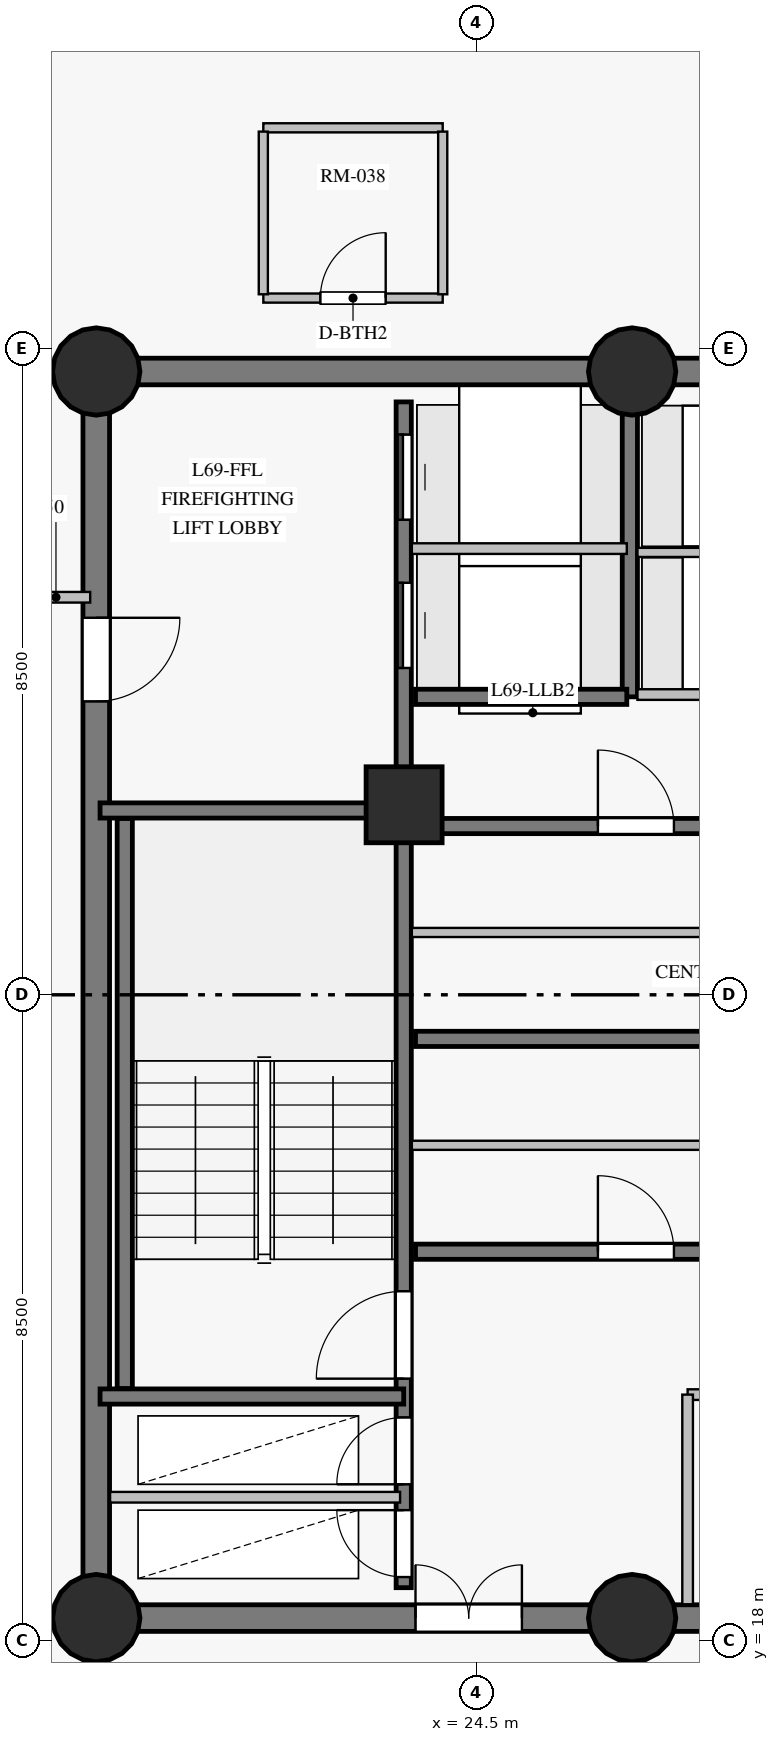
"""IFC4 building model, lengths in metres.
Left out: names, types, materials, properties, quantities, classifications, styles, units other than length and angle.
Written with IfcOpenShell. Run it as: python <this file> out.ifc"""

import sys

from ifc_helpers import new_model, si_unit, direction, frame, frame_2d, origin, origin_with_axes, origin_2d, place, context, subcontext, project, spatial, rectangle, circle, extrude, source, transform, mapped, element, fill, save


model = new_model("IFC4")
c1 = context("Model", 3, precision=1e-05, world=origin(), true_north=direction((0.0, 1.0)))
c2 = subcontext(c1, "Body", "Model", "MODEL_VIEW")
j1 = project(units=[si_unit("LENGTHUNIT", "METRE"), si_unit("PLANEANGLEUNIT", "RADIAN")], contexts=[c1])
p1 = place(None, origin())
s1 = spatial("IfcSite", under=j1, at=p1, CompositionType="ELEMENT")
p2 = place(p1, origin())
s2 = spatial("IfcBuilding", under=s1, at=p2, CompositionType="ELEMENT")
p3 = place(p2, frame((0.0, 0.0, 235.2)))
s3 = spatial("IfcBuildingStorey", under=s2, at=p3, CompositionType="ELEMENT", Elevation=235.2)
p4 = place(p3, frame((19.5, 18.3, 0.0), z_axis=(0.0, 0.0, 1.0), x_axis=(1.0, 0.0, 0.0)))
e1 = element("IfcWall", 1, at=p4, inside=s3, PredefinedType="SHEAR", context=c2, shape_type="SweptSolid", body=[
    extrude(rectangle(XDim=7.05, YDim=0.35, at=frame_2d((3.525, 0.0))), origin(), (0.0, 0.0, 1.0), 2.85),
])
p5 = place(p4, frame((4.2, 0.0, 0.0)))
e2 = element("IfcOpeningElement", 2, at=p5, cuts=e1, PredefinedType="OPENING", context=c2, shape_type="SweptSolid", body=[
    extrude(rectangle(XDim=1.4, YDim=2.2, at=frame_2d((0.7, 1.1))), frame((0.0, 0.185, 0.0), z_axis=(0.0, -1.0, 0.0), x_axis=(1.0, 0.0, 0.0)), (0.0, 0.0, 1.0), 0.37),
])
p6 = place(p3, frame((26.55, 18.3, 0.0), z_axis=(0.0, 0.0, 1.0), x_axis=(1.0, 0.0, 0.0)))
e3 = element("IfcWall", 3, at=p6, inside=s3, PredefinedType="SHEAR", context=c2, shape_type="SweptSolid", body=[
    extrude(rectangle(XDim=10.95, YDim=0.35, at=frame_2d((5.475, 0.0))), origin(), (0.0, 0.0, 1.0), 2.85),
])
p7 = place(p6, frame((4.55, 0.0, 0.0)))
e4 = element("IfcOpeningElement", 4, at=p7, cuts=e3, PredefinedType="OPENING", context=c2, shape_type="SweptSolid", body=[
    extrude(rectangle(XDim=1.4, YDim=2.2, at=frame_2d((0.7, 1.1))), frame((0.0, 0.185, 0.0), z_axis=(0.0, -1.0, 0.0), x_axis=(1.0, 0.0, 0.0)), (0.0, 0.0, 1.0), 0.37),
])
p8 = place(p3, frame((37.5, 34.7, 0.0), z_axis=(0.0, 0.0, 1.0), x_axis=(-1.0, 0.0, 0.0)))
e5 = element("IfcWall", 5, at=p8, inside=s3, PredefinedType="SHEAR", context=c2, shape_type="SweptSolid", body=[
    extrude(rectangle(XDim=10.95, YDim=0.35, at=frame_2d((5.475, 0.0))), origin(), (0.0, 0.0, 1.0), 2.85),
])
p9 = place(p8, frame((2.15, 0.0, 0.0)))
e6 = element("IfcOpeningElement", 6, at=p9, cuts=e5, PredefinedType="OPENING", context=c2, shape_type="SweptSolid", body=[
    extrude(rectangle(XDim=1.2, YDim=2.15, at=frame_2d((0.6, 1.075))), frame((0.0, 0.185, 0.0), z_axis=(0.0, -1.0, 0.0), x_axis=(1.0, 0.0, 0.0)), (0.0, 0.0, 1.0), 0.37),
])
p10 = place(p8, frame((6.35, 0.0, 0.0)))
e7 = element("IfcOpeningElement", 7, at=p10, cuts=e5, PredefinedType="OPENING", context=c2, shape_type="SweptSolid", body=[
    extrude(rectangle(XDim=1.1, YDim=2.15, at=frame_2d((0.55, 1.075))), frame((0.0, 0.185, 0.0), z_axis=(0.0, -1.0, 0.0), x_axis=(1.0, 0.0, 0.0)), (0.0, 0.0, 1.0), 0.37),
])
p11 = place(p3, frame((26.55, 34.7, 0.0), z_axis=(0.0, 0.0, 1.0), x_axis=(-1.0, 0.0, 0.0)))
e8 = element("IfcWall", 8, at=p11, inside=s3, PredefinedType="SHEAR", context=c2, shape_type="SweptSolid", body=[
    extrude(rectangle(XDim=7.05, YDim=0.35, at=frame_2d((3.525, 0.0))), origin(), (0.0, 0.0, 1.0), 2.85),
])
p12 = place(p3, frame((19.5, 34.7, 0.0), z_axis=(0.0, 0.0, 1.0), x_axis=(0.0, -1.0, 0.0)))
e9 = element("IfcWall", 9, at=p12, inside=s3, PredefinedType="SHEAR", context=c2, shape_type="SweptSolid", body=[
    extrude(rectangle(XDim=16.4, YDim=0.35, at=frame_2d((8.2, 0.0))), origin(), (0.0, 0.0, 1.0), 2.85),
])
p13 = place(p12, frame((3.24, 0.0, 0.0)))
e10 = element("IfcOpeningElement", 10, at=p13, cuts=e9, PredefinedType="OPENING", context=c2, shape_type="SweptSolid", body=[
    extrude(rectangle(XDim=1.1, YDim=2.15, at=frame_2d((0.55, 1.075))), frame((0.0, 0.185, 0.0), z_axis=(0.0, -1.0, 0.0), x_axis=(1.0, 0.0, 0.0)), (0.0, 0.0, 1.0), 0.37),
])
m1 = source(origin_with_axes(), c2, "Body", "SweptSolid", [
    extrude(circle(Radius=0.575, at=origin_2d()), origin(), (0.0, 0.0, 1.0), 3.05),
])
for number, where, z_axis, x_axis in (
    (11, (19.5, 18.3, 0.0), (0.0, 0.0, 1.0), (1.0, 0.0, 0.0)),
    (12, (26.55, 18.3, 0.0), (0.0, 0.0, 1.0), (1.0, 0.0, 0.0)),
    (13, (19.5, 34.7, 0.0), (0.0, 0.0, 1.0), (1.0, 0.0, 0.0)),
    (14, (26.55, 34.7, 0.0), (0.0, 0.0, 1.0), (1.0, 0.0, 0.0)),
):
    element("IfcColumn", number, at=place(p3, frame(where, z_axis=z_axis, x_axis=x_axis)), inside=s3, PredefinedType="COLUMN", context=c2, shape_type="MappedRepresentation", body=[
        mapped(m1, transform((0.0, 0.0, 0.0), scale=1.0)),
    ])
m2 = source(origin_with_axes(), c2, "Body", "SweptSolid", [
    extrude(rectangle(XDim=1.0, YDim=1.0, at=origin_2d()), origin(), (0.0, 0.0, 1.0), 3.05),
])
p14 = place(p3, frame((23.55, 29.0, 0.0), z_axis=(0.0, 0.0, 1.0), x_axis=(1.0, 0.0, 0.0)))
e15 = element("IfcColumn", 15, at=p14, inside=s3, PredefinedType="COLUMN", context=c2, shape_type="MappedRepresentation", body=[
    mapped(m2, transform((0.0, 0.0, 0.0), scale=1.0)),
])
p15 = place(p3, frame((23.545, 18.7, 0.0), z_axis=(0.0, 0.0, 1.0), x_axis=(0.0, 1.0, 0.0)))
e16 = element("IfcWall", 16, at=p15, inside=s3, PredefinedType="SHEAR", context=c2, shape_type="SweptSolid", body=[
    extrude(rectangle(XDim=15.6, YDim=0.2, at=frame_2d((7.8, 0.0))), origin(), (0.0, 0.0, 1.0), 2.85),
])
p16 = place(p15, frame((2.75, 0.0, 0.0)))
e17 = element("IfcOpeningElement", 17, at=p16, cuts=e16, PredefinedType="OPENING", context=c2, shape_type="SweptSolid", body=[
    extrude(rectangle(XDim=1.15, YDim=2.15, at=frame_2d((0.575, 1.075))), frame((0.0, 0.11, 0.0), z_axis=(0.0, -1.0, 0.0), x_axis=(1.0, 0.0, 0.0)), (0.0, 0.0, 1.0), 0.22),
])
p17 = place(p15, frame((0.14, 0.0, 0.0)))
e18 = element("IfcOpeningElement", 18, at=p17, cuts=e16, PredefinedType="OPENING", context=c2, shape_type="SweptSolid", body=[
    extrude(rectangle(XDim=0.88, YDim=2.1, at=frame_2d((0.44, 1.05))), frame((0.0, 0.11, 0.0), z_axis=(0.0, -1.0, 0.0), x_axis=(1.0, 0.0, 0.0)), (0.0, 0.0, 1.0), 0.22),
])
p18 = place(p15, frame((1.36, 0.0, 0.0)))
e19 = element("IfcOpeningElement", 19, at=p18, cuts=e16, PredefinedType="OPENING", context=c2, shape_type="SweptSolid", body=[
    extrude(rectangle(XDim=0.88, YDim=2.1, at=frame_2d((0.44, 1.05))), frame((0.0, 0.11, 0.0), z_axis=(0.0, -1.0, 0.0), x_axis=(1.0, 0.0, 0.0)), (0.0, 0.0, 1.0), 0.22),
])
p19 = place(p15, frame((12.1, 0.0, 0.0)))
e20 = element("IfcOpeningElement", 20, at=p19, cuts=e16, PredefinedType="OPENING", context=c2, shape_type="SweptSolid", body=[
    extrude(rectangle(XDim=1.12, YDim=2.15, at=frame_2d((0.56, 1.075))), frame((0.0, 0.11, 0.0), z_axis=(0.0, -1.0, 0.0), x_axis=(1.0, 0.0, 0.0)), (0.0, 0.0, 1.0), 0.22),
])
p20 = place(p15, frame((14.05, 0.0, 0.0)))
e21 = element("IfcOpeningElement", 21, at=p20, cuts=e16, PredefinedType="OPENING", context=c2, shape_type="SweptSolid", body=[
    extrude(rectangle(XDim=1.12, YDim=2.15, at=frame_2d((0.56, 1.075))), frame((0.0, 0.11, 0.0), z_axis=(0.0, -1.0, 0.0), x_axis=(1.0, 0.0, 0.0)), (0.0, 0.0, 1.0), 0.22),
])
p21 = place(p3, frame((23.7, 23.12, 0.0), z_axis=(0.0, 0.0, 1.0), x_axis=(1.0, 0.0, 0.0)))
e22 = element("IfcWall", 22, at=p21, inside=s3, PredefinedType="SHEAR", context=c2, shape_type="SweptSolid", body=[
    extrude(rectangle(XDim=9.6, YDim=0.2, at=frame_2d((4.8, 0.0))), origin(), (0.0, 0.0, 1.0), 2.85),
])
p22 = place(p21, frame((2.4, 0.0, 0.0)))
e23 = element("IfcOpeningElement", 23, at=p22, cuts=e22, PredefinedType="OPENING", context=c2, shape_type="SweptSolid", body=[
    extrude(rectangle(XDim=1.0, YDim=2.15, at=frame_2d((0.5, 1.075))), frame((0.0, 0.11, 0.0), z_axis=(0.0, -1.0, 0.0), x_axis=(1.0, 0.0, 0.0)), (0.0, 0.0, 1.0), 0.22),
])
p23 = place(p3, frame((23.7, 25.92, 0.0), z_axis=(0.0, 0.0, 1.0), x_axis=(1.0, 0.0, 0.0)))
e24 = element("IfcWall", 24, at=p23, inside=s3, PredefinedType="SHEAR", context=c2, shape_type="SweptSolid", body=[
    extrude(rectangle(XDim=9.6, YDim=0.2, at=frame_2d((4.8, 0.0))), origin(), (0.0, 0.0, 1.0), 2.85),
])
p24 = place(p3, frame((23.7, 28.72, 0.0), z_axis=(0.0, 0.0, 1.0), x_axis=(1.0, 0.0, 0.0)))
e25 = element("IfcWall", 25, at=p24, inside=s3, PredefinedType="SHEAR", context=c2, shape_type="SweptSolid", body=[
    extrude(rectangle(XDim=9.6, YDim=0.2, at=frame_2d((4.8, 0.0))), origin(), (0.0, 0.0, 1.0), 2.85),
])
p25 = place(p24, frame((2.4, 0.0, 0.0)))
e26 = element("IfcOpeningElement", 26, at=p25, cuts=e25, PredefinedType="OPENING", context=c2, shape_type="SweptSolid", body=[
    extrude(rectangle(XDim=1.0, YDim=2.15, at=frame_2d((0.5, 1.075))), frame((0.0, 0.11, 0.0), z_axis=(0.0, -1.0, 0.0), x_axis=(1.0, 0.0, 0.0)), (0.0, 0.0, 1.0), 0.22),
])
p26 = place(p3, frame((19.875, 21.32, 0.0), z_axis=(0.0, 0.0, 1.0), x_axis=(0.0, 1.0, 0.0)))
e27 = element("IfcWall", 27, at=p26, inside=s3, PredefinedType="SHEAR", context=c2, shape_type="SweptSolid", body=[
    extrude(rectangle(XDim=7.5, YDim=0.2, at=frame_2d((3.75, 0.0))), origin(), (0.0, 0.0, 1.0), 2.85),
])
for number, where, z_axis, x_axis in (
    (28, (19.55, 21.215, 0.0), (0.0, 0.0, 1.0), (1.0, 0.0, 0.0)),
    (29, (19.55, 28.925, 0.0), (0.0, 0.0, 1.0), (1.0, 0.0, 0.0)),
):
    element("IfcWall", number, at=place(p3, frame(where, z_axis=z_axis, x_axis=x_axis)), inside=s3, PredefinedType="SHEAR", context=c2, shape_type="SweptSolid", body=[
        extrude(rectangle(XDim=3.995, YDim=0.2, at=frame_2d((1.998, 0.0))), origin(), (0.0, 0.0, 1.0), 2.85),
    ])
p27 = place(p3, frame((26.52, 30.42, 0.0), z_axis=(0.0, 0.0, 1.0), x_axis=(0.0, 1.0, 0.0)))
e30 = element("IfcWall", 30, at=p27, inside=s3, PredefinedType="SHEAR", context=c2, shape_type="SweptSolid", body=[
    extrude(rectangle(XDim=3.86, YDim=0.2, at=frame_2d((1.93, 0.0))), origin(), (0.0, 0.0, 1.0), 2.85),
])
p28 = place(p3, frame((23.7, 30.42, 0.0), z_axis=(0.0, 0.0, 1.0), x_axis=(1.0, 0.0, 0.0)))
e31 = element("IfcWall", 31, at=p28, inside=s3, PredefinedType="SHEAR", context=c2, shape_type="SweptSolid", body=[
    extrude(rectangle(XDim=2.78, YDim=0.2, at=frame_2d((1.39, 0.0))), origin(), (0.0, 0.0, 1.0), 2.85),
])
p29 = place(p3, frame((23.652, 24.52, 0.0), z_axis=(0.0, 0.0, 1.0), x_axis=(1.0, 0.0, 0.0)))
e32 = element("IfcWall", 32, at=p29, inside=s3, PredefinedType="PARTITIONING", context=c2, shape_type="SweptSolid", body=[
    extrude(rectangle(XDim=9.698, YDim=0.12, at=frame_2d((4.849, 0.0))), origin(), (0.0, 0.0, 1.0), 2.85),
])
p30 = place(p29, frame((4.2, 0.0, 0.0)))
e33 = element("IfcOpeningElement", 33, at=p30, cuts=e32, PredefinedType="OPENING", context=c2, shape_type="SweptSolid", body=[
    extrude(rectangle(XDim=0.94, YDim=2.1, at=frame_2d((0.47, 1.05))), frame((0.0, 0.07, 0.0), z_axis=(0.0, -1.0, 0.0), x_axis=(1.0, 0.0, 0.0)), (0.0, 0.0, 1.0), 0.14),
])
p31 = place(p3, frame((23.652, 27.32, 0.0), z_axis=(0.0, 0.0, 1.0), x_axis=(1.0, 0.0, 0.0)))
e34 = element("IfcWall", 34, at=p31, inside=s3, PredefinedType="PARTITIONING", context=c2, shape_type="SweptSolid", body=[
    extrude(rectangle(XDim=9.698, YDim=0.12, at=frame_2d((4.849, 0.0))), origin(), (0.0, 0.0, 1.0), 2.85),
])
p32 = place(p31, frame((4.2, 0.0, 0.0)))
e35 = element("IfcOpeningElement", 35, at=p32, cuts=e34, PredefinedType="OPENING", context=c2, shape_type="SweptSolid", body=[
    extrude(rectangle(XDim=0.94, YDim=2.1, at=frame_2d((0.47, 1.05))), frame((0.0, 0.07, 0.0), z_axis=(0.0, -1.0, 0.0), x_axis=(1.0, 0.0, 0.0)), (0.0, 0.0, 1.0), 0.14),
])
p33 = place(p3, frame((19.682, 19.89, 0.0), z_axis=(0.0, 0.0, 1.0), x_axis=(1.0, 0.0, 0.0)))
e36 = element("IfcWall", 36, at=p33, inside=s3, PredefinedType="PARTITIONING", context=c2, shape_type="SweptSolid", body=[
    extrude(rectangle(XDim=3.815, YDim=0.14, at=frame_2d((1.908, 0.0))), origin(), (0.0, 0.0, 1.0), 2.85),
])
p34 = place(p3, frame((27.28, 21.24, 0.0), z_axis=(0.0, 0.0, 1.0), x_axis=(1.0, 0.0, 0.0)))
e37 = element("IfcWall", 37, at=p34, inside=s3, PredefinedType="PARTITIONING", context=c2, shape_type="SweptSolid", body=[
    extrude(rectangle(XDim=3.44, YDim=0.14, at=frame_2d((1.72, 0.0))), origin(), (0.0, 0.0, 1.0), 2.85),
])
p35 = place(p34, frame((0.45, 0.0, 0.0)))
e38 = element("IfcOpeningElement", 38, at=p35, cuts=e37, PredefinedType="OPENING", context=c2, shape_type="SweptSolid", body=[
    extrude(rectangle(XDim=0.92, YDim=2.1, at=frame_2d((0.46, 1.05))), frame((0.0, 0.08, 0.0), z_axis=(0.0, -1.0, 0.0), x_axis=(1.0, 0.0, 0.0)), (0.0, 0.0, 1.0), 0.16),
])
p36 = place(p3, frame((23.652, 32.37, 0.0), z_axis=(0.0, 0.0, 1.0), x_axis=(1.0, 0.0, 0.0)))
e39 = element("IfcWall", 39, at=p36, inside=s3, PredefinedType="PARTITIONING", context=c2, shape_type="SweptSolid", body=[
    extrude(rectangle(XDim=2.828, YDim=0.14, at=frame_2d((1.414, 0.0))), origin(), (0.0, 0.0, 1.0), 2.85),
])
p37 = place(p3, frame((19.42, 31.73, 0.0), z_axis=(0.0, 0.0, 1.0), x_axis=(-1.0, 0.0, 0.0)))
e40 = element("IfcWall", 40, at=p37, inside=s3, PredefinedType="PARTITIONING", context=c2, shape_type="SweptSolid", body=[
    extrude(rectangle(XDim=2.75, YDim=0.14, at=frame_2d((1.375, 0.0))), origin(), (0.0, 0.0, 1.0), 2.85),
])
p38 = place(p37, frame((0.9, 0.0, 0.0)))
e41 = element("IfcOpeningElement", 41, at=p38, cuts=e40, PredefinedType="OPENING", context=c2, shape_type="SweptSolid", body=[
    extrude(rectangle(XDim=0.96, YDim=2.15, at=frame_2d((0.48, 1.075))), frame((0.0, 0.08, 0.0), z_axis=(0.0, -1.0, 0.0), x_axis=(1.0, 0.0, 0.0)), (0.0, 0.0, 1.0), 0.16),
])
p39 = place(p3, frame((27.28, 18.482, 0.0), z_axis=(0.0, 0.0, 1.0), x_axis=(0.0, 1.0, 0.0)))
e42 = element("IfcWall", 42, at=p39, inside=s3, PredefinedType="PARTITIONING", context=c2, shape_type="SweptSolid", body=[
    extrude(rectangle(XDim=2.758, YDim=0.14, at=frame_2d((1.379, 0.0))), origin(), (0.0, 0.0, 1.0), 2.85),
])
p40 = place(p3, frame((26.62, 30.45, 0.0), z_axis=(0.0, 0.0, 1.0), x_axis=(1.0, 0.0, 0.0)))
e43 = element("IfcWall", 43, at=p40, inside=s3, PredefinedType="PARTITIONING", context=c2, shape_type="SweptSolid", body=[
    extrude(rectangle(XDim=2.58, YDim=0.14, at=frame_2d((1.29, 0.0))), origin(), (0.0, 0.0, 1.0), 2.85),
])
p41 = place(p3, frame((26.62, 32.32, 0.0), z_axis=(0.0, 0.0, 1.0), x_axis=(1.0, 0.0, 0.0)))
e44 = element("IfcWall", 44, at=p41, inside=s3, PredefinedType="PARTITIONING", context=c2, shape_type="SweptSolid", body=[
    extrude(rectangle(XDim=2.58, YDim=0.12, at=frame_2d((1.29, 0.0))), origin(), (0.0, 0.0, 1.0), 2.85),
])
p42 = place(p3, frame((21.698, 35.666, 0.0), z_axis=(0.0, 0.0, 1.0), x_axis=(1.0, 0.0, 0.0)))
e45 = element("IfcWall", 45, at=p42, inside=s3, PredefinedType="PARTITIONING", context=c2, shape_type="SweptSolid", body=[
    extrude(rectangle(XDim=2.36, YDim=0.12, at=frame_2d((1.18, 0.0))), origin(), (0.0, 0.0, 1.0), 2.45),
])
p43 = place(p42, frame((0.75, 0.0, 0.0)))
e46 = element("IfcOpeningElement", 46, at=p43, cuts=e45, PredefinedType="OPENING", context=c2, shape_type="SweptSolid", body=[
    extrude(rectangle(XDim=0.86, YDim=2.04, at=frame_2d((0.43, 1.02))), frame((0.0, 0.07, 0.0), z_axis=(0.0, -1.0, 0.0), x_axis=(1.0, 0.0, 0.0)), (0.0, 0.0, 1.0), 0.14),
])
p44 = place(p3, frame((24.058, 37.906, 0.0), z_axis=(0.0, 0.0, 1.0), x_axis=(-1.0, 0.0, 0.0)))
e47 = element("IfcWall", 47, at=p44, inside=s3, PredefinedType="PARTITIONING", context=c2, shape_type="SweptSolid", body=[
    extrude(rectangle(XDim=2.36, YDim=0.12, at=frame_2d((1.18, 0.0))), origin(), (0.0, 0.0, 1.0), 2.45),
])
for number, where, z_axis, x_axis in (
    (48, (24.058, 35.716, 0.0), (0.0, 0.0, 1.0), (0.0, 1.0, 0.0)),
    (49, (21.698, 37.856, 0.0), (0.0, 0.0, 1.0), (0.0, -1.0, 0.0)),
):
    element("IfcWall", number, at=place(p3, frame(where, z_axis=z_axis, x_axis=x_axis)), inside=s3, PredefinedType="PARTITIONING", context=c2, shape_type="SweptSolid", body=[
        extrude(rectangle(XDim=2.14, YDim=0.12, at=frame_2d((1.07, 0.0))), origin(), (0.0, 0.0, 1.0), 2.85),
    ])
m3 = source(origin_with_axes(), c2, "Body", "SweptSolid", [
    extrude(rectangle(XDim=1.15, YDim=2.15, at=frame_2d((0.575, 1.075))), frame((0.0, 0.025, 0.0), z_axis=(0.0, -1.0, 0.0), x_axis=(1.0, 0.0, 0.0)), (0.0, 0.0, 1.0), 0.05),
])
p45 = place(p16, origin())
e50 = element("IfcDoor", 50, at=p45, inside=s3, OperationType="SINGLE_SWING_LEFT", PredefinedType="DOOR", context=c2, shape_type="MappedRepresentation", body=[
    mapped(m3, transform((0.0, 0.0, 0.0), scale=1.0)),
])
fill(e17, e50)
m4 = source(origin_with_axes(), c2, "Body", "SweptSolid", [
    extrude(rectangle(XDim=1.1, YDim=2.15, at=frame_2d((0.55, 1.075))), frame((0.0, 0.025, 0.0), z_axis=(0.0, -1.0, 0.0), x_axis=(1.0, 0.0, 0.0)), (0.0, 0.0, 1.0), 0.05),
])
p46 = place(p13, origin())
e51 = element("IfcDoor", 51, at=p46, inside=s3, OperationType="SINGLE_SWING_LEFT", PredefinedType="DOOR", context=c2, shape_type="MappedRepresentation", body=[
    mapped(m4, transform((0.0, 0.0, 0.0), scale=1.0)),
])
fill(e10, e51)
m5 = source(origin_with_axes(), c2, "Body", "SweptSolid", [
    extrude(rectangle(XDim=0.88, YDim=2.1, at=frame_2d((0.44, 1.05))), frame((0.0, 0.025, 0.0), z_axis=(0.0, -1.0, 0.0), x_axis=(1.0, 0.0, 0.0)), (0.0, 0.0, 1.0), 0.05),
])
p47 = place(p17, origin())
e52 = element("IfcDoor", 52, at=p47, inside=s3, OperationType="SINGLE_SWING_RIGHT", PredefinedType="DOOR", context=c2, shape_type="MappedRepresentation", body=[
    mapped(m5, transform((0.0, 0.0, 0.0), scale=1.0)),
])
fill(e18, e52)
p48 = place(p18, origin())
e53 = element("IfcDoor", 53, at=p48, inside=s3, OperationType="SINGLE_SWING_LEFT", PredefinedType="DOOR", context=c2, shape_type="MappedRepresentation", body=[
    mapped(m5, transform((0.0, 0.0, 0.0), scale=1.0)),
])
fill(e19, e53)
m6 = source(origin_with_axes(), c2, "Body", "SweptSolid", [
    extrude(rectangle(XDim=1.4, YDim=2.2, at=frame_2d((0.7, 1.1))), frame((0.0, 0.025, 0.0), z_axis=(0.0, -1.0, 0.0), x_axis=(1.0, 0.0, 0.0)), (0.0, 0.0, 1.0), 0.05),
])
p49 = place(p5, origin())
e54 = element("IfcDoor", 54, at=p49, inside=s3, OperationType="DOUBLE_DOOR_SINGLE_SWING", PredefinedType="DOOR", context=c2, shape_type="MappedRepresentation", body=[
    mapped(m6, transform((0.0, 0.0, 0.0), scale=1.0)),
])
fill(e2, e54)
m7 = source(origin_with_axes(), c2, "Body", "SweptSolid", [
    extrude(rectangle(XDim=1.0, YDim=2.15, at=frame_2d((0.5, 1.075))), frame((0.0, 0.025, 0.0), z_axis=(0.0, -1.0, 0.0), x_axis=(1.0, 0.0, 0.0)), (0.0, 0.0, 1.0), 0.05),
])
p50 = place(p22, origin())
e55 = element("IfcDoor", 55, at=p50, inside=s3, OperationType="SINGLE_SWING_LEFT", PredefinedType="DOOR", context=c2, shape_type="MappedRepresentation", body=[
    mapped(m7, transform((0.0, 0.0, 0.0), scale=1.0)),
])
fill(e23, e55)
p51 = place(p25, origin())
e56 = element("IfcDoor", 56, at=p51, inside=s3, OperationType="SINGLE_SWING_LEFT", PredefinedType="DOOR", context=c2, shape_type="MappedRepresentation", body=[
    mapped(m7, transform((0.0, 0.0, 0.0), scale=1.0)),
])
fill(e26, e56)
m8 = source(origin_with_axes(), c2, "Body", "SweptSolid", [
    extrude(rectangle(XDim=1.12, YDim=2.15, at=frame_2d((0.56, 1.075))), frame((0.0, 0.025, 0.0), z_axis=(0.0, -1.0, 0.0), x_axis=(1.0, 0.0, 0.0)), (0.0, 0.0, 1.0), 0.05),
])
p52 = place(p19, origin())
e57 = element("IfcDoor", 57, at=p52, inside=s3, OperationType="SLIDING_TO_LEFT", PredefinedType="DOOR", context=c2, shape_type="MappedRepresentation", body=[
    mapped(m8, transform((0.0, 0.0, 0.0), scale=1.0)),
])
fill(e20, e57)
p53 = place(p20, origin())
e58 = element("IfcDoor", 58, at=p53, inside=s3, OperationType="SLIDING_TO_RIGHT", PredefinedType="DOOR", context=c2, shape_type="MappedRepresentation", body=[
    mapped(m8, transform((0.0, 0.0, 0.0), scale=1.0)),
])
fill(e21, e58)
m9 = source(origin_with_axes(), c2, "Body", "SweptSolid", [
    extrude(rectangle(XDim=0.86, YDim=2.04, at=frame_2d((0.43, 1.02))), frame((0.0, 0.025, 0.0), z_axis=(0.0, -1.0, 0.0), x_axis=(1.0, 0.0, 0.0)), (0.0, 0.0, 1.0), 0.05),
])
p54 = place(p43, origin())
e59 = element("IfcDoor", 59, at=p54, inside=s3, OperationType="SINGLE_SWING_RIGHT", PredefinedType="DOOR", context=c2, shape_type="MappedRepresentation", body=[
    mapped(m9, transform((0.0, 0.0, 0.0), scale=1.0)),
])
fill(e46, e59)
save(model, sys.argv[1])
